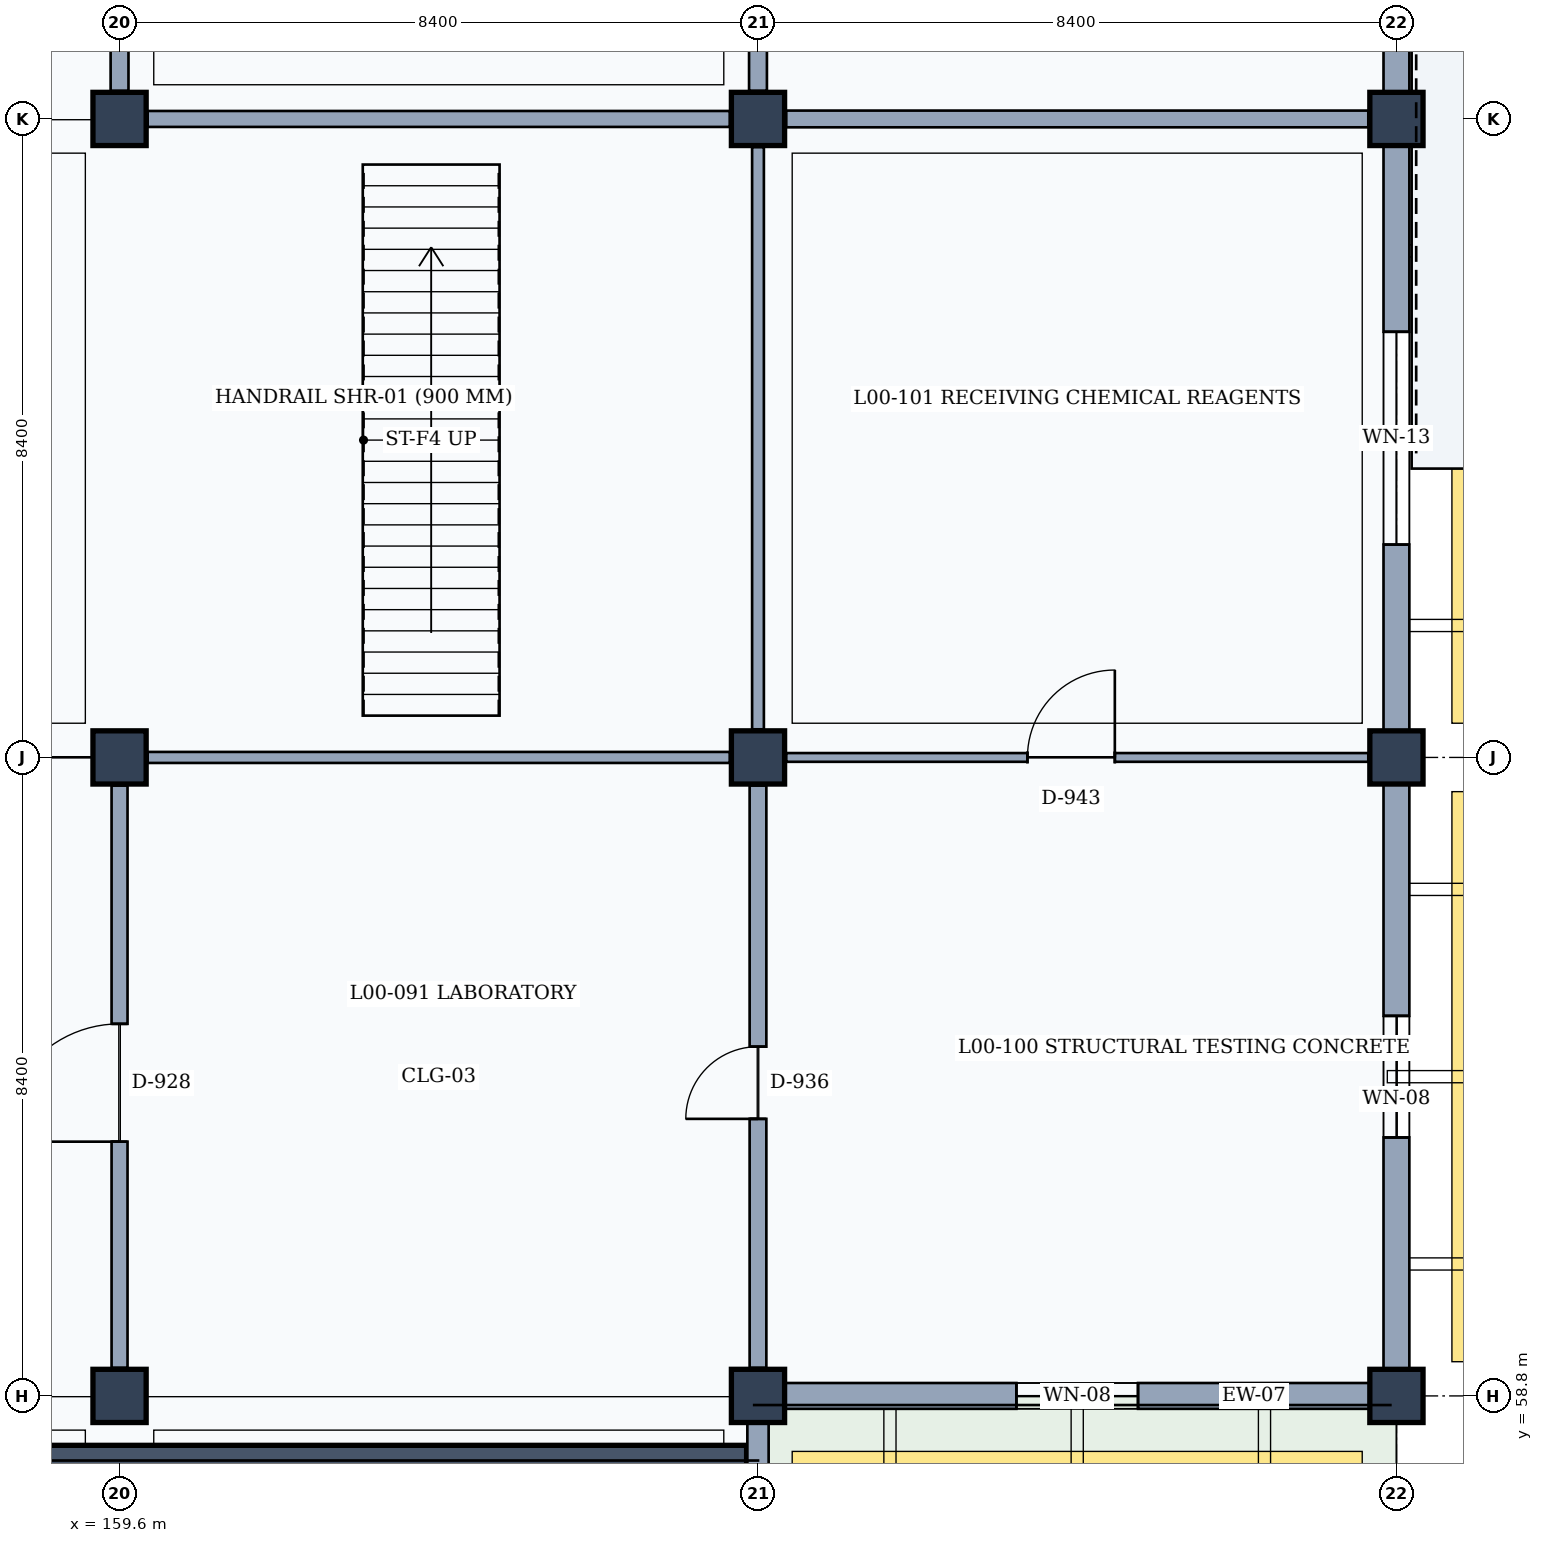
"""IFC4 building model, lengths in metres.
Left out: names, types, materials, properties, quantities, classifications, styles, units other than length and angle.
Written with IfcOpenShell. Run it as: python <this file> out.ifc"""

import sys

from ifc_helpers import new_model, si_unit, direction, frame, frame_2d, origin, origin_2d, place, context, subcontext, project, spatial, rectangle, extrude, element, fill, save


model = new_model("IFC4")
c1 = context("Model", 3, precision=1e-05, world=origin(), true_north=direction((0.0, 1.0)))
c2 = subcontext(c1, "Body", "Model", "MODEL_VIEW")
j1 = project(units=[si_unit("LENGTHUNIT", "METRE"), si_unit("PLANEANGLEUNIT", "RADIAN")], contexts=[c1])
p1 = place(None, origin())
s1 = spatial("IfcSite", under=j1, at=p1, CompositionType="ELEMENT")
p2 = place(p1, origin())
s2 = spatial("IfcBuilding", under=s1, at=p2, CompositionType="ELEMENT")
p3 = place(p2, origin())
s3 = spatial("IfcBuildingStorey", under=s2, at=p3, CompositionType="ELEMENT", Elevation=0.0)
for number, where, z_axis, x_axis in (
    (1, (159.6, 58.8, 0.0), (0.0, 0.0, 1.0), (1.0, 0.0, 0.0)),
    (2, (159.6, 67.2, 0.0), (0.0, 0.0, 1.0), (1.0, 0.0, 0.0)),
    (3, (159.6, 75.6, 0.0), (0.0, 0.0, 1.0), (1.0, 0.0, 0.0)),
    (4, (168.0, 58.8, 0.0), (0.0, 0.0, 1.0), (1.0, 0.0, 0.0)),
    (5, (168.0, 67.2, 0.0), (0.0, 0.0, 1.0), (1.0, 0.0, 0.0)),
    (6, (168.0, 75.6, 0.0), (0.0, 0.0, 1.0), (1.0, 0.0, 0.0)),
    (7, (176.4, 58.8, 0.0), (0.0, 0.0, 1.0), (1.0, 0.0, 0.0)),
    (8, (176.4, 67.2, 0.0), (0.0, 0.0, 1.0), (1.0, 0.0, 0.0)),
    (9, (176.4, 75.6, 0.0), (0.0, 0.0, 1.0), (1.0, 0.0, 0.0)),
):
    element("IfcColumn", number, at=place(p3, frame(where, z_axis=z_axis, x_axis=x_axis)), inside=s3, PredefinedType="COLUMN", context=c2, shape_type="SweptSolid", body=[
        extrude(rectangle(XDim=0.7, YDim=0.7, at=origin_2d()), origin(), (0.0, 0.0, 1.0), 4.8),
    ])
p4 = place(p3, frame((176.05, 58.8, 0.0), z_axis=(0.0, 0.0, 1.0), x_axis=(-1.0, 0.0, 0.0)))
e10 = element("IfcWall", 10, at=p4, inside=s3, PredefinedType="SOLIDWALL", context=c2, shape_type="SweptSolid", body=[
    extrude(rectangle(XDim=7.7, YDim=0.34, at=frame_2d((3.85, 0.0))), origin(), (0.0, 0.0, 1.0), 3.96),
])
p5 = place(p4, frame((3.05, 0.0, 0.95)))
e11 = element("IfcOpeningElement", 11, at=p5, cuts=e10, PredefinedType="OPENING", context=c2, shape_type="SweptSolid", body=[
    extrude(rectangle(XDim=1.6, YDim=2.0, at=frame_2d((0.8, 1.0))), frame((0.0, 0.18, 0.0), z_axis=(0.0, -1.0, 0.0), x_axis=(1.0, 0.0, 0.0)), (0.0, 0.0, 1.0), 0.36),
])
p6 = place(p3, frame((176.4, 66.85, 0.0), z_axis=(0.0, 0.0, 1.0), x_axis=(0.0, -1.0, 0.0)))
e12 = element("IfcWall", 12, at=p6, inside=s3, PredefinedType="SOLIDWALL", context=c2, shape_type="SweptSolid", body=[
    extrude(rectangle(XDim=7.7, YDim=0.34, at=frame_2d((3.85, 0.0))), origin(), (0.0, 0.0, 1.0), 3.96),
])
p7 = place(p6, frame((3.05, 0.0, 0.95)))
e13 = element("IfcOpeningElement", 13, at=p7, cuts=e12, PredefinedType="OPENING", context=c2, shape_type="SweptSolid", body=[
    extrude(rectangle(XDim=1.6, YDim=2.0, at=frame_2d((0.8, 1.0))), frame((0.0, 0.18, 0.0), z_axis=(0.0, -1.0, 0.0), x_axis=(1.0, 0.0, 0.0)), (0.0, 0.0, 1.0), 0.36),
])
p8 = place(p3, frame((176.4, 75.25, 0.0), z_axis=(0.0, 0.0, 1.0), x_axis=(0.0, -1.0, 0.0)))
e14 = element("IfcWall", 14, at=p8, inside=s3, PredefinedType="SOLIDWALL", context=c2, shape_type="SweptSolid", body=[
    extrude(rectangle(XDim=7.7, YDim=0.34, at=frame_2d((3.85, 0.0))), origin(), (0.0, 0.0, 1.0), 3.96),
])
p9 = place(p8, frame((2.45, 0.0, 0.95)))
e15 = element("IfcOpeningElement", 15, at=p9, cuts=e14, PredefinedType="OPENING", context=c2, shape_type="SweptSolid", body=[
    extrude(rectangle(XDim=2.8, YDim=1.65, at=frame_2d((1.4, 0.825))), frame((0.0, 0.18, 0.0), z_axis=(0.0, -1.0, 0.0), x_axis=(1.0, 0.0, 0.0)), (0.0, 0.0, 1.0), 0.36),
])
p10 = place(p3, frame((176.4, 83.65, 0.0), z_axis=(0.0, 0.0, 1.0), x_axis=(0.0, -1.0, 0.0)))
e16 = element("IfcWall", 16, at=p10, inside=s3, PredefinedType="SOLIDWALL", context=c2, shape_type="SweptSolid", body=[
    extrude(rectangle(XDim=7.7, YDim=0.34, at=frame_2d((3.85, 0.0))), origin(), (0.0, 0.0, 1.0), 3.96),
])
p11 = place(p10, frame((2.35, 0.0, 0.95)))
e17 = element("IfcOpeningElement", 17, at=p11, cuts=e16, PredefinedType="OPENING", context=c2, shape_type="SweptSolid", body=[
    extrude(rectangle(XDim=3.0, YDim=1.8, at=frame_2d((1.5, 0.9))), frame((0.0, 0.18, 0.0), z_axis=(0.0, -1.0, 0.0), x_axis=(1.0, 0.0, 0.0)), (0.0, 0.0, 1.0), 0.36),
])
p12 = place(p3, frame((167.85, 58.0, 0.0), z_axis=(0.0, 0.0, 1.0), x_axis=(-1.0, 0.0, 0.0)))
e18 = element("IfcWall", 18, at=p12, inside=s3, PredefinedType="SHEAR", context=c2, shape_type="SweptSolid", body=[
    extrude(rectangle(XDim=24.4, YDim=0.3, at=frame_2d((12.2, 0.0))), origin(), (0.0, 0.0, 1.0), 3.8),
])
p13 = place(p3, frame((168.0, 50.65, 0.0), z_axis=(0.0, 0.0, 1.0), x_axis=(0.0, 1.0, 0.0)))
e19 = element("IfcWall", 19, at=p13, inside=s3, PredefinedType="SOLIDWALL", context=c2, shape_type="SweptSolid", body=[
    extrude(rectangle(XDim=7.9, YDim=0.28, at=frame_2d((3.95, 0.0))), origin(), (0.0, 0.0, 1.0), 3.8),
])
p14 = place(p13, frame((0.925, 0.0, 0.0)))
e20 = element("IfcOpeningElement", 20, at=p14, cuts=e19, PredefinedType="OPENING", context=c2, shape_type="SweptSolid", body=[
    extrude(rectangle(XDim=6.05, YDim=3.1, at=frame_2d((3.025, 1.55))), frame((0.0, 0.15, 0.0), z_axis=(0.0, -1.0, 0.0), x_axis=(1.0, 0.0, 0.0)), (0.0, 0.0, 1.0), 0.3),
])
p15 = place(p3, frame((159.6, 59.17, 0.0), z_axis=(0.0, 0.0, 1.0), x_axis=(0.0, 1.0, 0.0)))
e21 = element("IfcWall", 21, at=p15, inside=s3, PredefinedType="PARTITIONING", context=c2, shape_type="SweptSolid", body=[
    extrude(rectangle(XDim=7.66, YDim=0.21, at=frame_2d((3.83, 0.0))), origin(), (0.0, 0.0, 1.0), 3.92),
])
p16 = place(p15, frame((2.975, 0.0, 0.0)))
e22 = element("IfcOpeningElement", 22, at=p16, cuts=e21, PredefinedType="OPENING", context=c2, shape_type="SweptSolid", body=[
    extrude(rectangle(XDim=1.55, YDim=2.35, at=frame_2d((0.775, 1.175))), frame((0.0, 0.115, 0.0), z_axis=(0.0, -1.0, 0.0), x_axis=(1.0, 0.0, 0.0)), (0.0, 0.0, 1.0), 0.23),
])
p17 = place(p3, frame((159.6, 75.97, 0.0), z_axis=(0.0, 0.0, 1.0), x_axis=(0.0, 1.0, 0.0)))
e23 = element("IfcWall", 23, at=p17, inside=s3, PredefinedType="PARTITIONING", context=c2, shape_type="SweptSolid", body=[
    extrude(rectangle(XDim=7.66, YDim=0.235, at=frame_2d((3.83, 0.0))), origin(), (0.0, 0.0, 1.0), 3.92),
])
p18 = place(p17, frame((2.9, 0.0, 0.0)))
e24 = element("IfcOpeningElement", 24, at=p18, cuts=e23, PredefinedType="OPENING", context=c2, shape_type="SweptSolid", body=[
    extrude(rectangle(XDim=1.7, YDim=2.3, at=frame_2d((0.85, 1.15))), frame((0.0, 0.127, 0.0), z_axis=(0.0, -1.0, 0.0), x_axis=(1.0, 0.0, 0.0)), (0.0, 0.0, 1.0), 0.255),
])
p19 = place(p3, frame((168.0, 59.17, 0.0), z_axis=(0.0, 0.0, 1.0), x_axis=(0.0, 1.0, 0.0)))
e25 = element("IfcWall", 25, at=p19, inside=s3, PredefinedType="PARTITIONING", context=c2, shape_type="SweptSolid", body=[
    extrude(rectangle(XDim=7.66, YDim=0.22, at=frame_2d((3.83, 0.0))), origin(), (0.0, 0.0, 1.0), 3.92),
])
p20 = place(p19, frame((3.275, 0.0, 0.0)))
e26 = element("IfcOpeningElement", 26, at=p20, cuts=e25, PredefinedType="OPENING", context=c2, shape_type="SweptSolid", body=[
    extrude(rectangle(XDim=0.95, YDim=2.15, at=frame_2d((0.475, 1.075))), frame((0.0, 0.12, 0.0), z_axis=(0.0, -1.0, 0.0), x_axis=(1.0, 0.0, 0.0)), (0.0, 0.0, 1.0), 0.24),
])
p21 = place(p3, frame((159.97, 67.2, 0.0), z_axis=(0.0, 0.0, 1.0), x_axis=(1.0, 0.0, 0.0)))
e27 = element("IfcWall", 27, at=p21, inside=s3, PredefinedType="PARTITIONING", context=c2, shape_type="SweptSolid", body=[
    extrude(rectangle(XDim=7.66, YDim=0.145, at=frame_2d((3.83, 0.0))), origin(), (0.0, 0.0, 1.0), 3.87),
])
p22 = place(p3, frame((168.0, 67.57, 0.0), z_axis=(0.0, 0.0, 1.0), x_axis=(0.0, 1.0, 0.0)))
e28 = element("IfcWall", 28, at=p22, inside=s3, PredefinedType="PARTITIONING", context=c2, shape_type="SweptSolid", body=[
    extrude(rectangle(XDim=7.66, YDim=0.155, at=frame_2d((3.83, 0.0))), origin(), (0.0, 0.0, 1.0), 3.92),
])
p23 = place(p3, frame((159.97, 75.6, 0.0), z_axis=(0.0, 0.0, 1.0), x_axis=(1.0, 0.0, 0.0)))
e29 = element("IfcWall", 29, at=p23, inside=s3, PredefinedType="PARTITIONING", context=c2, shape_type="SweptSolid", body=[
    extrude(rectangle(XDim=7.66, YDim=0.21, at=frame_2d((3.83, 0.0))), origin(), (0.0, 0.0, 1.0), 3.87),
])
p24 = place(p3, frame((168.0, 75.97, 0.0), z_axis=(0.0, 0.0, 1.0), x_axis=(0.0, 1.0, 0.0)))
e30 = element("IfcWall", 30, at=p24, inside=s3, PredefinedType="PARTITIONING", context=c2, shape_type="SweptSolid", body=[
    extrude(rectangle(XDim=7.66, YDim=0.235, at=frame_2d((3.83, 0.0))), origin(), (0.0, 0.0, 1.0), 3.92),
])
p25 = place(p24, frame((2.85, 0.0, 0.0)))
e31 = element("IfcOpeningElement", 31, at=p25, cuts=e30, PredefinedType="OPENING", context=c2, shape_type="SweptSolid", body=[
    extrude(rectangle(XDim=1.8, YDim=2.3, at=frame_2d((0.9, 1.15))), frame((0.0, 0.127, 0.0), z_axis=(0.0, -1.0, 0.0), x_axis=(1.0, 0.0, 0.0)), (0.0, 0.0, 1.0), 0.255),
])
p26 = place(p3, frame((168.37, 67.2, 0.0), z_axis=(0.0, 0.0, 1.0), x_axis=(1.0, 0.0, 0.0)))
e32 = element("IfcWall", 32, at=p26, inside=s3, PredefinedType="PARTITIONING", context=c2, shape_type="SweptSolid", body=[
    extrude(rectangle(XDim=7.66, YDim=0.115, at=frame_2d((3.83, 0.0))), origin(), (0.0, 0.0, 1.0), 3.87),
])
p27 = place(p26, frame((3.175, 0.0, 0.0)))
e33 = element("IfcOpeningElement", 33, at=p27, cuts=e32, PredefinedType="OPENING", context=c2, shape_type="SweptSolid", body=[
    extrude(rectangle(XDim=1.15, YDim=2.25, at=frame_2d((0.575, 1.125))), frame((0.0, 0.067, 0.0), z_axis=(0.0, -1.0, 0.0), x_axis=(1.0, 0.0, 0.0)), (0.0, 0.0, 1.0), 0.135),
])
p28 = place(p3, frame((168.37, 75.6, 0.0), z_axis=(0.0, 0.0, 1.0), x_axis=(1.0, 0.0, 0.0)))
e34 = element("IfcWall", 34, at=p28, inside=s3, PredefinedType="PARTITIONING", context=c2, shape_type="SweptSolid", body=[
    extrude(rectangle(XDim=7.66, YDim=0.22, at=frame_2d((3.83, 0.0))), origin(), (0.0, 0.0, 1.0), 3.87),
])
p29 = place(p5, origin())
e35 = element("IfcWindow", 35, at=p29, inside=s3, PartitioningType="SINGLE_PANEL", PredefinedType="WINDOW", context=c2, shape_type="SweptSolid", body=[
    extrude(rectangle(XDim=1.6, YDim=2.0, at=frame_2d((0.8, 1.0))), frame((0.0, 0.03, 0.0), z_axis=(0.0, -1.0, 0.0), x_axis=(1.0, 0.0, 0.0)), (0.0, 0.0, 1.0), 0.06),
])
fill(e11, e35)
p30 = place(p7, origin())
e36 = element("IfcWindow", 36, at=p30, inside=s3, PartitioningType="SINGLE_PANEL", PredefinedType="WINDOW", context=c2, shape_type="SweptSolid", body=[
    extrude(rectangle(XDim=1.6, YDim=2.0, at=frame_2d((0.8, 1.0))), frame((0.0, 0.03, 0.0), z_axis=(0.0, -1.0, 0.0), x_axis=(1.0, 0.0, 0.0)), (0.0, 0.0, 1.0), 0.06),
])
fill(e13, e36)
p31 = place(p9, origin())
e37 = element("IfcWindow", 37, at=p31, inside=s3, PartitioningType="SINGLE_PANEL", PredefinedType="WINDOW", context=c2, shape_type="SweptSolid", body=[
    extrude(rectangle(XDim=2.8, YDim=1.65, at=frame_2d((1.4, 0.825))), frame((0.0, 0.03, 0.0), z_axis=(0.0, -1.0, 0.0), x_axis=(1.0, 0.0, 0.0)), (0.0, 0.0, 1.0), 0.06),
])
fill(e15, e37)
p32 = place(p16, origin())
e38 = element("IfcDoor", 38, at=p32, inside=s3, OperationType="SINGLE_SWING_LEFT", PredefinedType="DOOR", context=c2, shape_type="SweptSolid", body=[
    extrude(rectangle(XDim=1.55, YDim=2.35, at=frame_2d((0.775, 1.175))), frame((0.0, 0.025, 0.0), z_axis=(0.0, -1.0, 0.0), x_axis=(1.0, 0.0, 0.0)), (0.0, 0.0, 1.0), 0.05),
])
fill(e22, e38)
p33 = place(p20, origin())
e39 = element("IfcDoor", 39, at=p33, inside=s3, OperationType="SINGLE_SWING_LEFT", PredefinedType="DOOR", context=c2, shape_type="SweptSolid", body=[
    extrude(rectangle(XDim=0.95, YDim=2.15, at=frame_2d((0.475, 1.075))), frame((0.0, 0.025, 0.0), z_axis=(0.0, -1.0, 0.0), x_axis=(1.0, 0.0, 0.0)), (0.0, 0.0, 1.0), 0.05),
])
fill(e26, e39)
p34 = place(p27, origin())
e40 = element("IfcDoor", 40, at=p34, inside=s3, OperationType="SINGLE_SWING_RIGHT", PredefinedType="DOOR", context=c2, shape_type="SweptSolid", body=[
    extrude(rectangle(XDim=1.15, YDim=2.25, at=frame_2d((0.575, 1.125))), frame((0.0, 0.025, 0.0), z_axis=(0.0, -1.0, 0.0), x_axis=(1.0, 0.0, 0.0)), (0.0, 0.0, 1.0), 0.05),
])
fill(e33, e40)
save(model, sys.argv[1])
